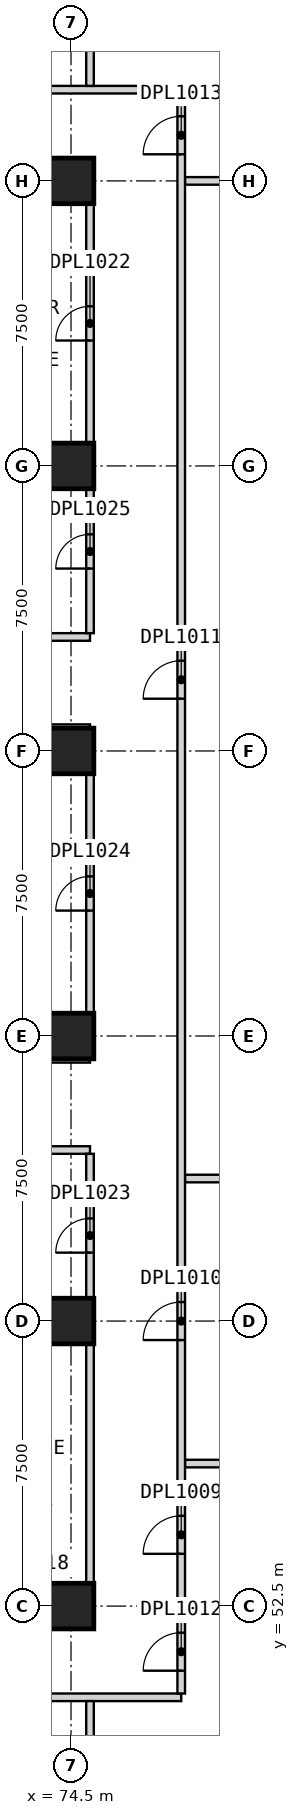
"""IFC4 building model, lengths in metres.
Left out: names, types, materials, properties, quantities, classifications, styles, units other than length and angle.
Written with IfcOpenShell. Run it as: python <this file> out.ifc"""

import sys

from ifc_helpers import new_model, si_unit, direction, frame, frame_2d, origin, origin_2d, place, context, subcontext, project, spatial, rectangle, extrude, element, fill, save


model = new_model("IFC4")
c1 = context("Model", 3, precision=1e-05, world=origin(), true_north=direction((0.0, 1.0)))
c2 = subcontext(c1, "Body", "Model", "MODEL_VIEW")
j1 = project(units=[si_unit("LENGTHUNIT", "METRE"), si_unit("PLANEANGLEUNIT", "RADIAN")], contexts=[c1])
p1 = place(None, origin())
s1 = spatial("IfcSite", under=j1, at=p1, CompositionType="ELEMENT")
p2 = place(p1, origin())
s2 = spatial("IfcBuilding", under=s1, at=p2, CompositionType="ELEMENT")
p3 = place(p2, frame((0.0, 0.0, 73.6)))
s3 = spatial("IfcBuildingStorey", under=s2, at=p3, CompositionType="ELEMENT", Elevation=73.6)
for number, where, z_axis, x_axis in (
    (1, (74.5, 52.5, 0.0), (0.0, 0.0, 1.0), (1.0, 0.0, 0.0)),
    (2, (74.5, 60.0, 0.0), (0.0, 0.0, 1.0), (1.0, 0.0, 0.0)),
    (3, (74.5, 67.5, 0.0), (0.0, 0.0, 1.0), (1.0, 0.0, 0.0)),
    (4, (74.5, 75.0, 0.0), (0.0, 0.0, 1.0), (1.0, 0.0, 0.0)),
    (5, (74.5, 82.5, 0.0), (0.0, 0.0, 1.0), (1.0, 0.0, 0.0)),
    (6, (74.5, 90.0, 0.0), (0.0, 0.0, 1.0), (1.0, 0.0, 0.0)),
):
    element("IfcColumn", number, at=place(p3, frame(where, z_axis=z_axis, x_axis=x_axis)), inside=s3, PredefinedType="COLUMN", context=c2, shape_type="SweptSolid", body=[
        extrude(rectangle(XDim=1.2, YDim=1.2, at=origin_2d()), origin(), (0.0, 0.0, 1.0), 5.5),
    ])
p4 = place(p3, frame((30.0, 50.1, 0.0), z_axis=(0.0, 0.0, 1.0), x_axis=(1.0, 0.0, 0.0)))
e7 = element("IfcWall", 7, at=p4, inside=s3, PredefinedType="PARTITIONING", context=c2, shape_type="SweptSolid", body=[
    extrude(rectangle(XDim=47.4, YDim=0.2, at=frame_2d((23.7, 0.0))), origin(), (0.0, 0.0, 1.0), 5.25),
])
p5 = place(p4, frame((7.0, 0.0, 0.0)))
e8 = element("IfcOpeningElement", 8, at=p5, cuts=e7, PredefinedType="OPENING", context=c2, shape_type="SweptSolid", body=[
    extrude(rectangle(XDim=1.0, YDim=2.1, at=frame_2d((0.5, 1.05))), frame((0.0, 0.11, 0.0), z_axis=(0.0, -1.0, 0.0), x_axis=(1.0, 0.0, 0.0)), (0.0, 0.0, 1.0), 0.22),
])
p6 = place(p4, frame((12.625, 0.0, 0.0)))
e9 = element("IfcOpeningElement", 9, at=p6, cuts=e7, PredefinedType="OPENING", context=c2, shape_type="SweptSolid", body=[
    extrude(rectangle(XDim=1.0, YDim=2.1, at=frame_2d((0.5, 1.05))), frame((0.0, 0.11, 0.0), z_axis=(0.0, -1.0, 0.0), x_axis=(1.0, 0.0, 0.0)), (0.0, 0.0, 1.0), 0.22),
])
p7 = place(p4, frame((18.25, 0.0, 0.0)))
e10 = element("IfcOpeningElement", 10, at=p7, cuts=e7, PredefinedType="OPENING", context=c2, shape_type="SweptSolid", body=[
    extrude(rectangle(XDim=1.0, YDim=2.1, at=frame_2d((0.5, 1.05))), frame((0.0, 0.11, 0.0), z_axis=(0.0, -1.0, 0.0), x_axis=(1.0, 0.0, 0.0)), (0.0, 0.0, 1.0), 0.22),
])
p8 = place(p4, frame((33.25, 0.0, 0.0)))
e11 = element("IfcOpeningElement", 11, at=p8, cuts=e7, PredefinedType="OPENING", context=c2, shape_type="SweptSolid", body=[
    extrude(rectangle(XDim=1.0, YDim=2.1, at=frame_2d((0.5, 1.05))), frame((0.0, 0.11, 0.0), z_axis=(0.0, -1.0, 0.0), x_axis=(1.0, 0.0, 0.0)), (0.0, 0.0, 1.0), 0.22),
])
p9 = place(p3, frame((60.0, 52.5, 0.0), z_axis=(0.0, 0.0, 1.0), x_axis=(1.0, 0.0, 0.0)))
e12 = element("IfcWall", 12, at=p9, inside=s3, PredefinedType="PARTITIONING", context=c2, shape_type="SweptSolid", body=[
    extrude(rectangle(XDim=15.0, YDim=0.2, at=frame_2d((7.5, 0.0))), origin(), (0.0, 0.0, 1.0), 5.25),
])
p10 = place(p9, frame((5.475, 0.0, 0.0)))
e13 = element("IfcOpeningElement", 13, at=p10, cuts=e12, PredefinedType="OPENING", context=c2, shape_type="SweptSolid", body=[
    extrude(rectangle(XDim=0.9, YDim=2.1, at=frame_2d((0.45, 1.05))), frame((0.0, 0.11, 0.0), z_axis=(0.0, -1.0, 0.0), x_axis=(1.0, 0.0, 0.0)), (0.0, 0.0, 1.0), 0.22),
])
p11 = place(p9, frame((12.925, 0.0, 0.0)))
e14 = element("IfcOpeningElement", 14, at=p11, cuts=e12, PredefinedType="OPENING", context=c2, shape_type="SweptSolid", body=[
    extrude(rectangle(XDim=0.9, YDim=2.1, at=frame_2d((0.45, 1.05))), frame((0.0, 0.11, 0.0), z_axis=(0.0, -1.0, 0.0), x_axis=(1.0, 0.0, 0.0)), (0.0, 0.0, 1.0), 0.22),
])
for number, where, z_axis, x_axis in (
    (15, (77.5, 52.5, 0.0), (0.0, 0.0, 1.0), (1.0, 0.0, 0.0)),
    (16, (77.5, 56.25, 0.0), (0.0, 0.0, 1.0), (1.0, 0.0, 0.0)),
):
    element("IfcWall", number, at=place(p3, frame(where, z_axis=z_axis, x_axis=x_axis)), inside=s3, PredefinedType="PARTITIONING", context=c2, shape_type="SweptSolid", body=[
        extrude(rectangle(XDim=12.5, YDim=0.2, at=frame_2d((6.25, 0.0))), origin(), (0.0, 0.0, 1.0), 5.25),
    ])
p12 = place(p3, frame((60.0, 60.0, 0.0), z_axis=(0.0, 0.0, 1.0), x_axis=(1.0, 0.0, 0.0)))
e17 = element("IfcWall", 17, at=p12, inside=s3, PredefinedType="PARTITIONING", context=c2, shape_type="SweptSolid", body=[
    extrude(rectangle(XDim=14.9, YDim=0.2, at=frame_2d((7.45, 0.0))), origin(), (0.0, 0.0, 1.0), 5.25),
])
p13 = place(p3, frame((77.5, 63.75, 0.0), z_axis=(0.0, 0.0, 1.0), x_axis=(1.0, 0.0, 0.0)))
e18 = element("IfcWall", 18, at=p13, inside=s3, PredefinedType="PARTITIONING", context=c2, shape_type="SweptSolid", body=[
    extrude(rectangle(XDim=12.5, YDim=0.2, at=frame_2d((6.25, 0.0))), origin(), (0.0, 0.0, 1.0), 5.25),
])
for number, where, z_axis, x_axis in (
    (19, (60.0, 64.5, 0.0), (0.0, 0.0, 1.0), (1.0, 0.0, 0.0)),
    (20, (60.0, 66.9, 0.0), (0.0, 0.0, 1.0), (1.0, 0.0, 0.0)),
    (21, (60.0, 75.6, 0.0), (0.0, 0.0, 1.0), (1.0, 0.0, 0.0)),
    (22, (60.0, 78.0, 0.0), (0.0, 0.0, 1.0), (1.0, 0.0, 0.0)),
):
    element("IfcWall", number, at=place(p3, frame(where, z_axis=z_axis, x_axis=x_axis)), inside=s3, PredefinedType="PARTITIONING", context=c2, shape_type="SweptSolid", body=[
        extrude(rectangle(XDim=15.0, YDim=0.2, at=frame_2d((7.5, 0.0))), origin(), (0.0, 0.0, 1.0), 5.25),
    ])
p14 = place(p3, frame((60.0, 82.5, 0.0), z_axis=(0.0, 0.0, 1.0), x_axis=(1.0, 0.0, 0.0)))
e23 = element("IfcWall", 23, at=p14, inside=s3, PredefinedType="PARTITIONING", context=c2, shape_type="SweptSolid", body=[
    extrude(rectangle(XDim=14.9, YDim=0.2, at=frame_2d((7.45, 0.0))), origin(), (0.0, 0.0, 1.0), 5.25),
])
p15 = place(p3, frame((30.0, 90.0, 0.0), z_axis=(0.0, 0.0, 1.0), x_axis=(1.0, 0.0, 0.0)))
e24 = element("IfcWall", 24, at=p15, inside=s3, PredefinedType="PARTITIONING", context=c2, shape_type="SweptSolid", body=[
    extrude(rectangle(XDim=45.0, YDim=0.2, at=frame_2d((22.5, 0.0))), origin(), (0.0, 0.0, 1.0), 5.25),
])
p16 = place(p15, frame((12.525, 0.0, 0.0)))
e25 = element("IfcOpeningElement", 25, at=p16, cuts=e24, PredefinedType="OPENING", context=c2, shape_type="SweptSolid", body=[
    extrude(rectangle(XDim=0.9, YDim=2.1, at=frame_2d((0.45, 1.05))), frame((0.0, 0.11, 0.0), z_axis=(0.0, -1.0, 0.0), x_axis=(1.0, 0.0, 0.0)), (0.0, 0.0, 1.0), 0.22),
])
p17 = place(p15, frame((31.275, 0.0, 0.0)))
e26 = element("IfcOpeningElement", 26, at=p17, cuts=e24, PredefinedType="OPENING", context=c2, shape_type="SweptSolid", body=[
    extrude(rectangle(XDim=0.9, YDim=2.1, at=frame_2d((0.45, 1.05))), frame((0.0, 0.11, 0.0), z_axis=(0.0, -1.0, 0.0), x_axis=(1.0, 0.0, 0.0)), (0.0, 0.0, 1.0), 0.22),
])
p18 = place(p15, frame((39.225, 0.0, 0.0)))
e27 = element("IfcOpeningElement", 27, at=p18, cuts=e24, PredefinedType="OPENING", context=c2, shape_type="SweptSolid", body=[
    extrude(rectangle(XDim=0.9, YDim=2.1, at=frame_2d((0.45, 1.05))), frame((0.0, 0.11, 0.0), z_axis=(0.0, -1.0, 0.0), x_axis=(1.0, 0.0, 0.0)), (0.0, 0.0, 1.0), 0.22),
])
p19 = place(p3, frame((77.5, 90.0, 0.0), z_axis=(0.0, 0.0, 1.0), x_axis=(1.0, 0.0, 0.0)))
e28 = element("IfcWall", 28, at=p19, inside=s3, PredefinedType="PARTITIONING", context=c2, shape_type="SweptSolid", body=[
    extrude(rectangle(XDim=12.5, YDim=0.2, at=frame_2d((6.25, 0.0))), origin(), (0.0, 0.0, 1.0), 5.25),
])
p20 = place(p3, frame((30.0, 92.4, 0.0), z_axis=(0.0, 0.0, 1.0), x_axis=(1.0, 0.0, 0.0)))
e29 = element("IfcWall", 29, at=p20, inside=s3, PredefinedType="PARTITIONING", context=c2, shape_type="SweptSolid", body=[
    extrude(rectangle(XDim=47.4, YDim=0.2, at=frame_2d((23.7, 0.0))), origin(), (0.0, 0.0, 1.0), 5.25),
])
p21 = place(p20, frame((1.375, 0.0, 0.0)))
e30 = element("IfcOpeningElement", 30, at=p21, cuts=e29, PredefinedType="OPENING", context=c2, shape_type="SweptSolid", body=[
    extrude(rectangle(XDim=1.0, YDim=2.1, at=frame_2d((0.5, 1.05))), frame((0.0, 0.11, 0.0), z_axis=(0.0, -1.0, 0.0), x_axis=(1.0, 0.0, 0.0)), (0.0, 0.0, 1.0), 0.22),
])
p22 = place(p20, frame((10.75, 0.0, 0.0)))
e31 = element("IfcOpeningElement", 31, at=p22, cuts=e29, PredefinedType="OPENING", context=c2, shape_type="SweptSolid", body=[
    extrude(rectangle(XDim=1.0, YDim=2.1, at=frame_2d((0.5, 1.05))), frame((0.0, 0.11, 0.0), z_axis=(0.0, -1.0, 0.0), x_axis=(1.0, 0.0, 0.0)), (0.0, 0.0, 1.0), 0.22),
])
p23 = place(p20, frame((25.75, 0.0, 0.0)))
e32 = element("IfcOpeningElement", 32, at=p23, cuts=e29, PredefinedType="OPENING", context=c2, shape_type="SweptSolid", body=[
    extrude(rectangle(XDim=1.0, YDim=2.1, at=frame_2d((0.5, 1.05))), frame((0.0, 0.11, 0.0), z_axis=(0.0, -1.0, 0.0), x_axis=(1.0, 0.0, 0.0)), (0.0, 0.0, 1.0), 0.22),
])
p24 = place(p20, frame((38.875, 0.0, 0.0)))
e33 = element("IfcOpeningElement", 33, at=p24, cuts=e29, PredefinedType="OPENING", context=c2, shape_type="SweptSolid", body=[
    extrude(rectangle(XDim=1.0, YDim=2.1, at=frame_2d((0.5, 1.05))), frame((0.0, 0.11, 0.0), z_axis=(0.0, -1.0, 0.0), x_axis=(1.0, 0.0, 0.0)), (0.0, 0.0, 1.0), 0.22),
])
p25 = place(p3, frame((75.0, 37.5, 0.0), z_axis=(0.0, 0.0, 1.0), x_axis=(0.0, 1.0, 0.0)))
e34 = element("IfcWall", 34, at=p25, inside=s3, PredefinedType="PARTITIONING", context=c2, shape_type="SweptSolid", body=[
    extrude(rectangle(XDim=12.5, YDim=0.2, at=frame_2d((6.25, 0.0))), origin(), (0.0, 0.0, 1.0), 5.25),
])
p26 = place(p3, frame((75.0, 52.6, 0.0), z_axis=(0.0, 0.0, 1.0), x_axis=(0.0, 1.0, 0.0)))
e35 = element("IfcWall", 35, at=p26, inside=s3, PredefinedType="PARTITIONING", context=c2, shape_type="SweptSolid", body=[
    extrude(rectangle(XDim=11.8, YDim=0.2, at=frame_2d((5.9, 0.0))), origin(), (0.0, 0.0, 1.0), 5.25),
])
p27 = place(p26, frame((9.2, 0.0, 0.0)))
e36 = element("IfcOpeningElement", 36, at=p27, cuts=e35, PredefinedType="OPENING", context=c2, shape_type="SweptSolid", body=[
    extrude(rectangle(XDim=0.9, YDim=2.1, at=frame_2d((0.45, 1.05))), frame((0.0, 0.11, 0.0), z_axis=(0.0, -1.0, 0.0), x_axis=(1.0, 0.0, 0.0)), (0.0, 0.0, 1.0), 0.22),
])
p28 = place(p3, frame((75.0, 67.0, 0.0), z_axis=(0.0, 0.0, 1.0), x_axis=(0.0, 1.0, 0.0)))
e37 = element("IfcWall", 37, at=p28, inside=s3, PredefinedType="PARTITIONING", context=c2, shape_type="SweptSolid", body=[
    extrude(rectangle(XDim=8.5, YDim=0.2, at=frame_2d((4.25, 0.0))), origin(), (0.0, 0.0, 1.0), 5.25),
])
p29 = place(p28, frame((3.8, 0.0, 0.0)))
e38 = element("IfcOpeningElement", 38, at=p29, cuts=e37, PredefinedType="OPENING", context=c2, shape_type="SweptSolid", body=[
    extrude(rectangle(XDim=0.9, YDim=2.1, at=frame_2d((0.45, 1.05))), frame((0.0, 0.11, 0.0), z_axis=(0.0, -1.0, 0.0), x_axis=(1.0, 0.0, 0.0)), (0.0, 0.0, 1.0), 0.22),
])
p30 = place(p3, frame((75.0, 78.1, 0.0), z_axis=(0.0, 0.0, 1.0), x_axis=(0.0, 1.0, 0.0)))
e39 = element("IfcWall", 39, at=p30, inside=s3, PredefinedType="PARTITIONING", context=c2, shape_type="SweptSolid", body=[
    extrude(rectangle(XDim=11.8, YDim=0.2, at=frame_2d((5.9, 0.0))), origin(), (0.0, 0.0, 1.0), 5.25),
])
p31 = place(p30, frame((7.7, 0.0, 0.0)))
e40 = element("IfcOpeningElement", 40, at=p31, cuts=e39, PredefinedType="OPENING", context=c2, shape_type="SweptSolid", body=[
    extrude(rectangle(XDim=0.9, YDim=2.1, at=frame_2d((0.45, 1.05))), frame((0.0, 0.11, 0.0), z_axis=(0.0, -1.0, 0.0), x_axis=(1.0, 0.0, 0.0)), (0.0, 0.0, 1.0), 0.22),
])
p32 = place(p30, frame((1.7, 0.0, 0.0)))
e41 = element("IfcOpeningElement", 41, at=p32, cuts=e39, PredefinedType="OPENING", context=c2, shape_type="SweptSolid", body=[
    extrude(rectangle(XDim=0.9, YDim=2.1, at=frame_2d((0.45, 1.05))), frame((0.0, 0.11, 0.0), z_axis=(0.0, -1.0, 0.0), x_axis=(1.0, 0.0, 0.0)), (0.0, 0.0, 1.0), 0.22),
])
p33 = place(p3, frame((75.0, 92.5, 0.0), z_axis=(0.0, 0.0, 1.0), x_axis=(0.0, 1.0, 0.0)))
e42 = element("IfcWall", 42, at=p33, inside=s3, PredefinedType="PARTITIONING", context=c2, shape_type="SweptSolid", body=[
    extrude(rectangle(XDim=12.5, YDim=0.2, at=frame_2d((6.25, 0.0))), origin(), (0.0, 0.0, 1.0), 5.25),
])
p34 = place(p3, frame((77.4, 50.2, 0.0), z_axis=(0.0, 0.0, 1.0), x_axis=(0.0, 1.0, 0.0)))
e43 = element("IfcWall", 43, at=p34, inside=s3, PredefinedType="PARTITIONING", context=c2, shape_type="SweptSolid", body=[
    extrude(rectangle(XDim=42.1, YDim=0.2, at=frame_2d((21.05, 0.0))), origin(), (0.0, 0.0, 1.0), 5.25),
])
p35 = place(p34, frame((3.675, 0.0, 0.0)))
e44 = element("IfcOpeningElement", 44, at=p35, cuts=e43, PredefinedType="OPENING", context=c2, shape_type="SweptSolid", body=[
    extrude(rectangle(XDim=1.0, YDim=2.1, at=frame_2d((0.5, 1.05))), frame((0.0, 0.11, 0.0), z_axis=(0.0, -1.0, 0.0), x_axis=(1.0, 0.0, 0.0)), (0.0, 0.0, 1.0), 0.22),
])
p36 = place(p34, frame((9.3, 0.0, 0.0)))
e45 = element("IfcOpeningElement", 45, at=p36, cuts=e43, PredefinedType="OPENING", context=c2, shape_type="SweptSolid", body=[
    extrude(rectangle(XDim=1.0, YDim=2.1, at=frame_2d((0.5, 1.05))), frame((0.0, 0.11, 0.0), z_axis=(0.0, -1.0, 0.0), x_axis=(1.0, 0.0, 0.0)), (0.0, 0.0, 1.0), 0.22),
])
p37 = place(p34, frame((26.175, 0.0, 0.0)))
e46 = element("IfcOpeningElement", 46, at=p37, cuts=e43, PredefinedType="OPENING", context=c2, shape_type="SweptSolid", body=[
    extrude(rectangle(XDim=1.0, YDim=2.1, at=frame_2d((0.5, 1.05))), frame((0.0, 0.11, 0.0), z_axis=(0.0, -1.0, 0.0), x_axis=(1.0, 0.0, 0.0)), (0.0, 0.0, 1.0), 0.22),
])
p38 = place(p34, frame((0.6, 0.0, 0.0)))
e47 = element("IfcOpeningElement", 47, at=p38, cuts=e43, PredefinedType="OPENING", context=c2, shape_type="SweptSolid", body=[
    extrude(rectangle(XDim=1.0, YDim=2.1, at=frame_2d((0.5, 1.05))), frame((0.0, 0.11, 0.0), z_axis=(0.0, -1.0, 0.0), x_axis=(1.0, 0.0, 0.0)), (0.0, 0.0, 1.0), 0.22),
])
p39 = place(p34, frame((40.5, 0.0, 0.0)))
e48 = element("IfcOpeningElement", 48, at=p39, cuts=e43, PredefinedType="OPENING", context=c2, shape_type="SweptSolid", body=[
    extrude(rectangle(XDim=1.0, YDim=2.1, at=frame_2d((0.5, 1.05))), frame((0.0, 0.11, 0.0), z_axis=(0.0, -1.0, 0.0), x_axis=(1.0, 0.0, 0.0)), (0.0, 0.0, 1.0), 0.22),
])
p40 = place(p35, origin())
e49 = element("IfcDoor", 49, at=p40, inside=s3, OperationType="SINGLE_SWING_RIGHT", PredefinedType="DOOR", context=c2, shape_type="SweptSolid", body=[
    extrude(rectangle(XDim=1.0, YDim=2.1, at=frame_2d((0.5, 1.05))), frame((0.0, 0.025, 0.0), z_axis=(0.0, -1.0, 0.0), x_axis=(1.0, 0.0, 0.0)), (0.0, 0.0, 1.0), 0.05),
])
fill(e44, e49)
p41 = place(p36, origin())
e50 = element("IfcDoor", 50, at=p41, inside=s3, OperationType="SINGLE_SWING_RIGHT", PredefinedType="DOOR", context=c2, shape_type="SweptSolid", body=[
    extrude(rectangle(XDim=1.0, YDim=2.1, at=frame_2d((0.5, 1.05))), frame((0.0, 0.025, 0.0), z_axis=(0.0, -1.0, 0.0), x_axis=(1.0, 0.0, 0.0)), (0.0, 0.0, 1.0), 0.05),
])
fill(e45, e50)
p42 = place(p37, origin())
e51 = element("IfcDoor", 51, at=p42, inside=s3, OperationType="SINGLE_SWING_RIGHT", PredefinedType="DOOR", context=c2, shape_type="SweptSolid", body=[
    extrude(rectangle(XDim=1.0, YDim=2.1, at=frame_2d((0.5, 1.05))), frame((0.0, 0.025, 0.0), z_axis=(0.0, -1.0, 0.0), x_axis=(1.0, 0.0, 0.0)), (0.0, 0.0, 1.0), 0.05),
])
fill(e46, e51)
p43 = place(p38, origin())
e52 = element("IfcDoor", 52, at=p43, inside=s3, OperationType="SINGLE_SWING_LEFT", PredefinedType="DOOR", context=c2, shape_type="SweptSolid", body=[
    extrude(rectangle(XDim=1.0, YDim=2.1, at=frame_2d((0.5, 1.05))), frame((0.0, 0.025, 0.0), z_axis=(0.0, -1.0, 0.0), x_axis=(1.0, 0.0, 0.0)), (0.0, 0.0, 1.0), 0.05),
])
fill(e47, e52)
p44 = place(p39, origin())
e53 = element("IfcDoor", 53, at=p44, inside=s3, OperationType="SINGLE_SWING_LEFT", PredefinedType="DOOR", context=c2, shape_type="SweptSolid", body=[
    extrude(rectangle(XDim=1.0, YDim=2.1, at=frame_2d((0.5, 1.05))), frame((0.0, 0.025, 0.0), z_axis=(0.0, -1.0, 0.0), x_axis=(1.0, 0.0, 0.0)), (0.0, 0.0, 1.0), 0.05),
])
fill(e48, e53)
p45 = place(p31, origin())
e54 = element("IfcDoor", 54, at=p45, inside=s3, OperationType="SINGLE_SWING_LEFT", PredefinedType="DOOR", context=c2, shape_type="SweptSolid", body=[
    extrude(rectangle(XDim=0.9, YDim=2.1, at=frame_2d((0.45, 1.05))), frame((0.0, 0.025, 0.0), z_axis=(0.0, -1.0, 0.0), x_axis=(1.0, 0.0, 0.0)), (0.0, 0.0, 1.0), 0.05),
])
fill(e40, e54)
p46 = place(p27, origin())
e55 = element("IfcDoor", 55, at=p46, inside=s3, OperationType="SINGLE_SWING_LEFT", PredefinedType="DOOR", context=c2, shape_type="SweptSolid", body=[
    extrude(rectangle(XDim=0.9, YDim=2.1, at=frame_2d((0.45, 1.05))), frame((0.0, 0.025, 0.0), z_axis=(0.0, -1.0, 0.0), x_axis=(1.0, 0.0, 0.0)), (0.0, 0.0, 1.0), 0.05),
])
fill(e36, e55)
p47 = place(p29, origin())
e56 = element("IfcDoor", 56, at=p47, inside=s3, OperationType="SINGLE_SWING_LEFT", PredefinedType="DOOR", context=c2, shape_type="SweptSolid", body=[
    extrude(rectangle(XDim=0.9, YDim=2.1, at=frame_2d((0.45, 1.05))), frame((0.0, 0.025, 0.0), z_axis=(0.0, -1.0, 0.0), x_axis=(1.0, 0.0, 0.0)), (0.0, 0.0, 1.0), 0.05),
])
fill(e38, e56)
p48 = place(p32, origin())
e57 = element("IfcDoor", 57, at=p48, inside=s3, OperationType="SINGLE_SWING_LEFT", PredefinedType="DOOR", context=c2, shape_type="SweptSolid", body=[
    extrude(rectangle(XDim=0.9, YDim=2.1, at=frame_2d((0.45, 1.05))), frame((0.0, 0.025, 0.0), z_axis=(0.0, -1.0, 0.0), x_axis=(1.0, 0.0, 0.0)), (0.0, 0.0, 1.0), 0.05),
])
fill(e41, e57)
save(model, sys.argv[1])
